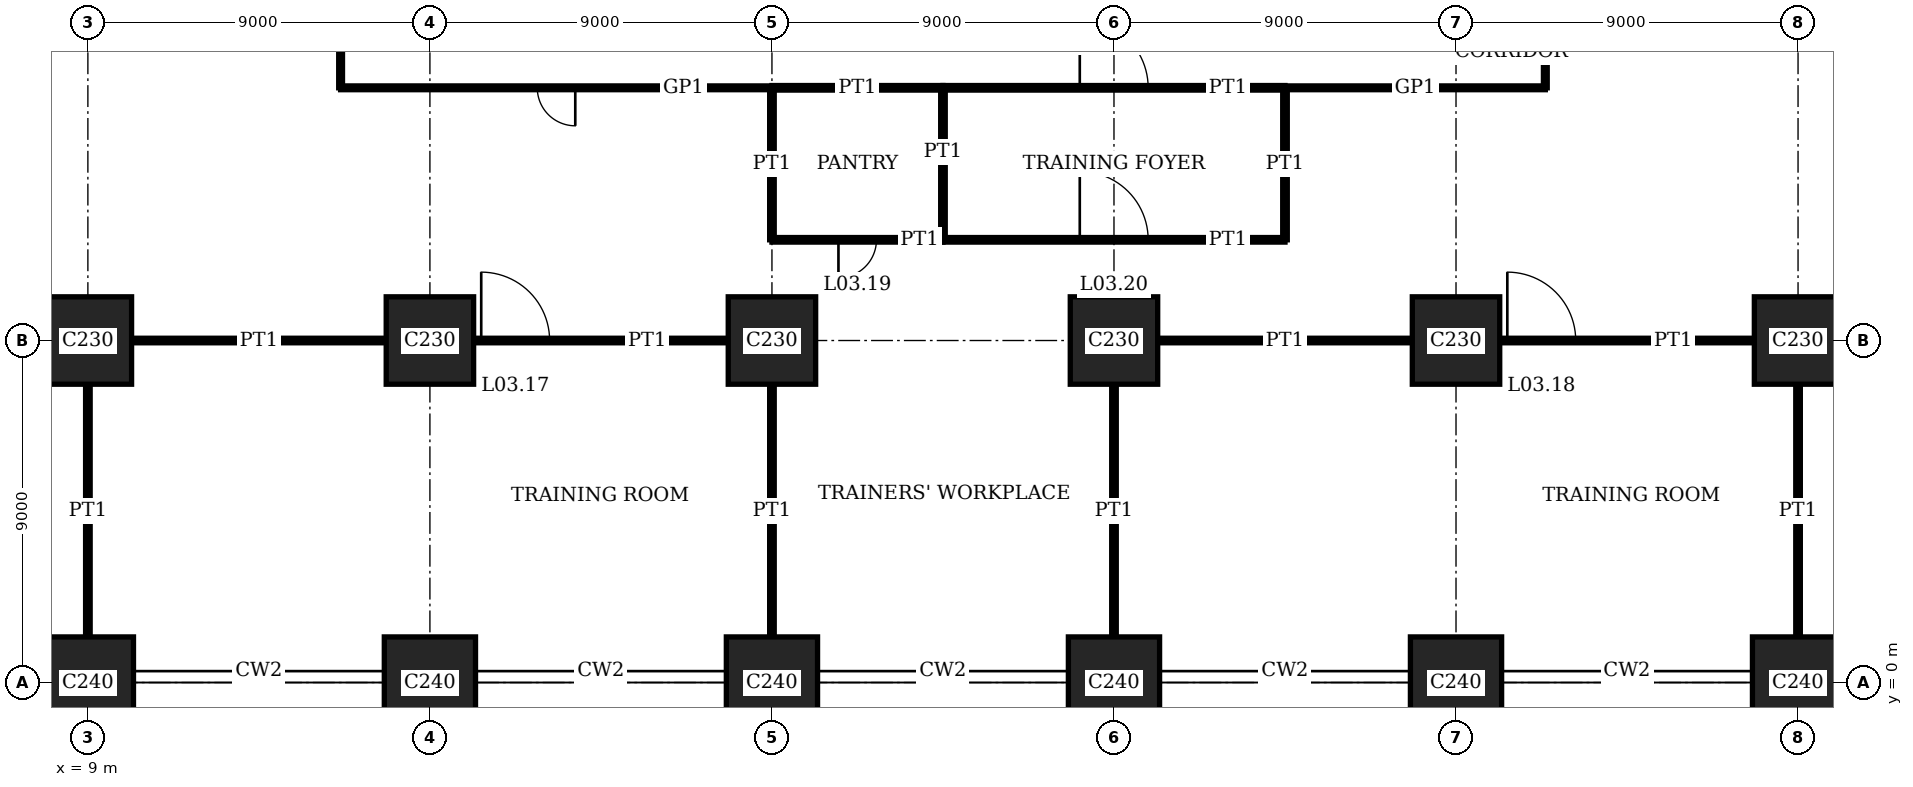
"""IFC4 building model, lengths in metres.
Left out: names, types, materials, properties, quantities, classifications, styles, units other than length and angle.
Written with IfcOpenShell. Run it as: python <this file> out.ifc"""

import sys

from ifc_helpers import new_model, si_unit, direction, frame, frame_2d, origin, origin_2d, place, context, subcontext, project, spatial, rectangle, extrude, element, fill, save


model = new_model("IFC4")
c1 = context("Model", 3, precision=1e-05, world=origin(), true_north=direction((0.0, 1.0)))
c2 = subcontext(c1, "Body", "Model", "MODEL_VIEW")
j1 = project(units=[si_unit("LENGTHUNIT", "METRE"), si_unit("PLANEANGLEUNIT", "RADIAN")], contexts=[c1])
p1 = place(None, origin())
s1 = spatial("IfcSite", under=j1, at=p1, CompositionType="ELEMENT")
p2 = place(p1, origin())
s2 = spatial("IfcBuilding", under=s1, at=p2, CompositionType="ELEMENT")
p3 = place(p2, frame((0.0, 0.0, 15.8)))
s3 = spatial("IfcBuildingStorey", under=s2, at=p3, CompositionType="ELEMENT", Elevation=15.8)
p4 = place(p3, frame((9.0, 0.0, 0.0), z_axis=(0.0, 0.0, 1.0), x_axis=(1.0, 0.0, 0.0)))
e1 = element("IfcColumn", 1, at=p4, inside=s3, PredefinedType="COLUMN", context=c2, shape_type="SweptSolid", body=[
    extrude(rectangle(XDim=2.4, YDim=2.4, at=origin_2d()), origin(), (0.0, 0.0, 1.0), 4.0),
])
p5 = place(p3, frame((9.0, 9.0, 0.0), z_axis=(0.0, 0.0, 1.0), x_axis=(1.0, 0.0, 0.0)))
e2 = element("IfcColumn", 2, at=p5, inside=s3, PredefinedType="COLUMN", context=c2, shape_type="SweptSolid", body=[
    extrude(rectangle(XDim=2.3, YDim=2.3, at=origin_2d()), origin(), (0.0, 0.0, 1.0), 4.0),
])
p6 = place(p3, frame((18.0, 0.0, 0.0), z_axis=(0.0, 0.0, 1.0), x_axis=(1.0, 0.0, 0.0)))
e3 = element("IfcColumn", 3, at=p6, inside=s3, PredefinedType="COLUMN", context=c2, shape_type="SweptSolid", body=[
    extrude(rectangle(XDim=2.4, YDim=2.4, at=origin_2d()), origin(), (0.0, 0.0, 1.0), 4.0),
])
p7 = place(p3, frame((18.0, 9.0, 0.0), z_axis=(0.0, 0.0, 1.0), x_axis=(1.0, 0.0, 0.0)))
e4 = element("IfcColumn", 4, at=p7, inside=s3, PredefinedType="COLUMN", context=c2, shape_type="SweptSolid", body=[
    extrude(rectangle(XDim=2.3, YDim=2.3, at=origin_2d()), origin(), (0.0, 0.0, 1.0), 4.0),
])
p8 = place(p3, frame((27.0, 0.0, 0.0), z_axis=(0.0, 0.0, 1.0), x_axis=(1.0, 0.0, 0.0)))
e5 = element("IfcColumn", 5, at=p8, inside=s3, PredefinedType="COLUMN", context=c2, shape_type="SweptSolid", body=[
    extrude(rectangle(XDim=2.4, YDim=2.4, at=origin_2d()), origin(), (0.0, 0.0, 1.0), 4.0),
])
p9 = place(p3, frame((27.0, 9.0, 0.0), z_axis=(0.0, 0.0, 1.0), x_axis=(1.0, 0.0, 0.0)))
e6 = element("IfcColumn", 6, at=p9, inside=s3, PredefinedType="COLUMN", context=c2, shape_type="SweptSolid", body=[
    extrude(rectangle(XDim=2.3, YDim=2.3, at=origin_2d()), origin(), (0.0, 0.0, 1.0), 4.0),
])
p10 = place(p3, frame((36.0, 0.0, 0.0), z_axis=(0.0, 0.0, 1.0), x_axis=(1.0, 0.0, 0.0)))
e7 = element("IfcColumn", 7, at=p10, inside=s3, PredefinedType="COLUMN", context=c2, shape_type="SweptSolid", body=[
    extrude(rectangle(XDim=2.4, YDim=2.4, at=origin_2d()), origin(), (0.0, 0.0, 1.0), 4.0),
])
p11 = place(p3, frame((36.0, 9.0, 0.0), z_axis=(0.0, 0.0, 1.0), x_axis=(1.0, 0.0, 0.0)))
e8 = element("IfcColumn", 8, at=p11, inside=s3, PredefinedType="COLUMN", context=c2, shape_type="SweptSolid", body=[
    extrude(rectangle(XDim=2.3, YDim=2.3, at=origin_2d()), origin(), (0.0, 0.0, 1.0), 4.0),
])
p12 = place(p3, frame((45.0, 0.0, 0.0), z_axis=(0.0, 0.0, 1.0), x_axis=(1.0, 0.0, 0.0)))
e9 = element("IfcColumn", 9, at=p12, inside=s3, PredefinedType="COLUMN", context=c2, shape_type="SweptSolid", body=[
    extrude(rectangle(XDim=2.4, YDim=2.4, at=origin_2d()), origin(), (0.0, 0.0, 1.0), 4.0),
])
p13 = place(p3, frame((45.0, 9.0, 0.0), z_axis=(0.0, 0.0, 1.0), x_axis=(1.0, 0.0, 0.0)))
e10 = element("IfcColumn", 10, at=p13, inside=s3, PredefinedType="COLUMN", context=c2, shape_type="SweptSolid", body=[
    extrude(rectangle(XDim=2.3, YDim=2.3, at=origin_2d()), origin(), (0.0, 0.0, 1.0), 4.0),
])
p14 = place(p3, frame((54.0, 0.0, 0.0), z_axis=(0.0, 0.0, 1.0), x_axis=(1.0, 0.0, 0.0)))
e11 = element("IfcColumn", 11, at=p14, inside=s3, PredefinedType="COLUMN", context=c2, shape_type="SweptSolid", body=[
    extrude(rectangle(XDim=2.4, YDim=2.4, at=origin_2d()), origin(), (0.0, 0.0, 1.0), 4.0),
])
p15 = place(p3, frame((54.0, 9.0, 0.0), z_axis=(0.0, 0.0, 1.0), x_axis=(1.0, 0.0, 0.0)))
e12 = element("IfcColumn", 12, at=p15, inside=s3, PredefinedType="COLUMN", context=c2, shape_type="SweptSolid", body=[
    extrude(rectangle(XDim=2.3, YDim=2.3, at=origin_2d()), origin(), (0.0, 0.0, 1.0), 4.0),
])
p16 = place(p3, frame((10.15, 9.0, 0.0), z_axis=(0.0, 0.0, 1.0), x_axis=(1.0, 0.0, 0.0)))
e13 = element("IfcWall", 13, at=p16, inside=s3, PredefinedType="PARTITIONING", context=c2, shape_type="SweptSolid", body=[
    extrude(rectangle(XDim=6.7, YDim=0.12, at=frame_2d((3.35, 0.0))), origin(), (0.0, 0.0, 1.0), 3.05),
])
p17 = place(p3, frame((19.15, 9.0, 0.0), z_axis=(0.0, 0.0, 1.0), x_axis=(1.0, 0.0, 0.0)))
e14 = element("IfcWall", 14, at=p17, inside=s3, PredefinedType="PARTITIONING", context=c2, shape_type="SweptSolid", body=[
    extrude(rectangle(XDim=6.7, YDim=0.12, at=frame_2d((3.35, 0.0))), origin(), (0.0, 0.0, 1.0), 3.05),
])
p18 = place(p17, frame((0.2, 0.0, 0.0)))
e15 = element("IfcOpeningElement", 15, at=p18, cuts=e14, PredefinedType="OPENING", context=c2, shape_type="SweptSolid", body=[
    extrude(rectangle(XDim=1.8, YDim=2.4, at=frame_2d((0.9, 1.2))), frame((0.0, 0.07, 0.0), z_axis=(0.0, -1.0, 0.0), x_axis=(1.0, 0.0, 0.0)), (0.0, 0.0, 1.0), 0.14),
])
p19 = place(p3, frame((37.15, 9.0, 0.0), z_axis=(0.0, 0.0, 1.0), x_axis=(1.0, 0.0, 0.0)))
e16 = element("IfcWall", 16, at=p19, inside=s3, PredefinedType="PARTITIONING", context=c2, shape_type="SweptSolid", body=[
    extrude(rectangle(XDim=6.7, YDim=0.12, at=frame_2d((3.35, 0.0))), origin(), (0.0, 0.0, 1.0), 3.05),
])
p20 = place(p3, frame((46.15, 9.0, 0.0), z_axis=(0.0, 0.0, 1.0), x_axis=(1.0, 0.0, 0.0)))
e17 = element("IfcWall", 17, at=p20, inside=s3, PredefinedType="PARTITIONING", context=c2, shape_type="SweptSolid", body=[
    extrude(rectangle(XDim=6.7, YDim=0.12, at=frame_2d((3.35, 0.0))), origin(), (0.0, 0.0, 1.0), 3.05),
])
p21 = place(p20, frame((0.2, 0.0, 0.0)))
e18 = element("IfcOpeningElement", 18, at=p21, cuts=e17, PredefinedType="OPENING", context=c2, shape_type="SweptSolid", body=[
    extrude(rectangle(XDim=1.8, YDim=2.4, at=frame_2d((0.9, 1.2))), frame((0.0, 0.07, 0.0), z_axis=(0.0, -1.0, 0.0), x_axis=(1.0, 0.0, 0.0)), (0.0, 0.0, 1.0), 0.14),
])
p22 = place(p3, frame((27.0, 11.65, 0.0), z_axis=(0.0, 0.0, 1.0), x_axis=(1.0, 0.0, 0.0)))
e19 = element("IfcWall", 19, at=p22, inside=s3, PredefinedType="PARTITIONING", context=c2, shape_type="SweptSolid", body=[
    extrude(rectangle(XDim=4.5, YDim=0.12, at=frame_2d((2.25, 0.0))), origin(), (0.0, 0.0, 1.0), 3.75),
])
p23 = place(p22, frame((1.75, 0.0, 0.0)))
e20 = element("IfcOpeningElement", 20, at=p23, cuts=e19, PredefinedType="OPENING", context=c2, shape_type="SweptSolid", body=[
    extrude(rectangle(XDim=1.0, YDim=2.4, at=frame_2d((0.5, 1.2))), frame((0.0, 0.07, 0.0), z_axis=(0.0, -1.0, 0.0), x_axis=(1.0, 0.0, 0.0)), (0.0, 0.0, 1.0), 0.14),
])
p24 = place(p3, frame((31.5, 11.65, 0.0), z_axis=(0.0, 0.0, 1.0), x_axis=(1.0, 0.0, 0.0)))
e21 = element("IfcWall", 21, at=p24, inside=s3, PredefinedType="PARTITIONING", context=c2, shape_type="SweptSolid", body=[
    extrude(rectangle(XDim=9.0, YDim=0.12, at=frame_2d((4.5, 0.0))), origin(), (0.0, 0.0, 1.0), 3.75),
])
p25 = place(p24, frame((3.6, 0.0, 0.0)))
e22 = element("IfcOpeningElement", 22, at=p25, cuts=e21, PredefinedType="OPENING", context=c2, shape_type="SweptSolid", body=[
    extrude(rectangle(XDim=1.8, YDim=2.4, at=frame_2d((0.9, 1.2))), frame((0.0, 0.07, 0.0), z_axis=(0.0, -1.0, 0.0), x_axis=(1.0, 0.0, 0.0)), (0.0, 0.0, 1.0), 0.14),
])
p26 = place(p3, frame((27.0, 15.65, 0.0), z_axis=(0.0, 0.0, 1.0), x_axis=(1.0, 0.0, 0.0)))
e23 = element("IfcWall", 23, at=p26, inside=s3, PredefinedType="PARTITIONING", context=c2, shape_type="SweptSolid", body=[
    extrude(rectangle(XDim=4.5, YDim=0.12, at=frame_2d((2.25, 0.0))), origin(), (0.0, 0.0, 1.0), 3.75),
])
p27 = place(p3, frame((31.5, 15.65, 0.0), z_axis=(0.0, 0.0, 1.0), x_axis=(1.0, 0.0, 0.0)))
e24 = element("IfcWall", 24, at=p27, inside=s3, PredefinedType="PARTITIONING", context=c2, shape_type="SweptSolid", body=[
    extrude(rectangle(XDim=9.0, YDim=0.12, at=frame_2d((4.5, 0.0))), origin(), (0.0, 0.0, 1.0), 3.75),
])
p28 = place(p27, frame((3.6, 0.0, 0.0)))
e25 = element("IfcOpeningElement", 25, at=p28, cuts=e24, PredefinedType="OPENING", context=c2, shape_type="SweptSolid", body=[
    extrude(rectangle(XDim=1.8, YDim=2.4, at=frame_2d((0.9, 1.2))), frame((0.0, 0.07, 0.0), z_axis=(0.0, -1.0, 0.0), x_axis=(1.0, 0.0, 0.0)), (0.0, 0.0, 1.0), 0.14),
])
p29 = place(p3, frame((15.65, 15.65, 0.0), z_axis=(0.0, 0.0, 1.0), x_axis=(1.0, 0.0, 0.0)))
e26 = element("IfcWall", 26, at=p29, inside=s3, PredefinedType="PARTITIONING", context=c2, shape_type="SweptSolid", body=[
    extrude(rectangle(XDim=11.35, YDim=0.1, at=frame_2d((5.675, 0.0))), origin(), (0.0, 0.0, 1.0), 3.75),
])
p30 = place(p29, frame((5.175, 0.0, 0.0)))
e27 = element("IfcOpeningElement", 27, at=p30, cuts=e26, PredefinedType="OPENING", context=c2, shape_type="SweptSolid", body=[
    extrude(rectangle(XDim=1.0, YDim=2.4, at=frame_2d((0.5, 1.2))), frame((0.0, 0.06, 0.0), z_axis=(0.0, -1.0, 0.0), x_axis=(1.0, 0.0, 0.0)), (0.0, 0.0, 1.0), 0.12),
])
p31 = place(p3, frame((40.5, 15.65, 0.0), z_axis=(0.0, 0.0, 1.0), x_axis=(1.0, 0.0, 0.0)))
e28 = element("IfcWall", 28, at=p31, inside=s3, PredefinedType="PARTITIONING", context=c2, shape_type="SweptSolid", body=[
    extrude(rectangle(XDim=6.85, YDim=0.1, at=frame_2d((3.425, 0.0))), origin(), (0.0, 0.0, 1.0), 3.75),
])
p32 = place(p3, frame((9.0, 1.2, 0.0), z_axis=(0.0, 0.0, 1.0), x_axis=(0.0, 1.0, 0.0)))
e29 = element("IfcWall", 29, at=p32, inside=s3, PredefinedType="PARTITIONING", context=c2, shape_type="SweptSolid", body=[
    extrude(rectangle(XDim=6.65, YDim=0.12, at=frame_2d((3.325, 0.0))), origin(), (0.0, 0.0, 1.0), 3.05),
])
p33 = place(p3, frame((15.65, 15.65, 0.0), z_axis=(0.0, 0.0, 1.0), x_axis=(0.0, 1.0, 0.0)))
e30 = element("IfcWall", 30, at=p33, inside=s3, PredefinedType="PARTITIONING", context=c2, shape_type="SweptSolid", body=[
    extrude(rectangle(XDim=22.7, YDim=0.1, at=frame_2d((11.35, 0.0))), origin(), (0.0, 0.0, 1.0), 3.75),
])
p34 = place(p33, frame((10.85, 0.0, 0.0)))
e31 = element("IfcOpeningElement", 31, at=p34, cuts=e30, PredefinedType="OPENING", context=c2, shape_type="SweptSolid", body=[
    extrude(rectangle(XDim=1.0, YDim=2.4, at=frame_2d((0.5, 1.2))), frame((0.0, 0.06, 0.0), z_axis=(0.0, -1.0, 0.0), x_axis=(1.0, 0.0, 0.0)), (0.0, 0.0, 1.0), 0.12),
])
p35 = place(p3, frame((27.0, 1.2, 0.0), z_axis=(0.0, 0.0, 1.0), x_axis=(0.0, 1.0, 0.0)))
e32 = element("IfcWall", 32, at=p35, inside=s3, PredefinedType="PARTITIONING", context=c2, shape_type="SweptSolid", body=[
    extrude(rectangle(XDim=6.65, YDim=0.12, at=frame_2d((3.325, 0.0))), origin(), (0.0, 0.0, 1.0), 3.05),
])
p36 = place(p3, frame((27.0, 11.65, 0.0), z_axis=(0.0, 0.0, 1.0), x_axis=(0.0, 1.0, 0.0)))
e33 = element("IfcWall", 33, at=p36, inside=s3, PredefinedType="PARTITIONING", context=c2, shape_type="SweptSolid", body=[
    extrude(rectangle(XDim=4.0, YDim=0.12, at=frame_2d((2.0, 0.0))), origin(), (0.0, 0.0, 1.0), 3.05),
])
p37 = place(p3, frame((31.5, 11.65, 0.0), z_axis=(0.0, 0.0, 1.0), x_axis=(0.0, 1.0, 0.0)))
e34 = element("IfcWall", 34, at=p37, inside=s3, PredefinedType="PARTITIONING", context=c2, shape_type="SweptSolid", body=[
    extrude(rectangle(XDim=4.0, YDim=0.12, at=frame_2d((2.0, 0.0))), origin(), (0.0, 0.0, 1.0), 3.75),
])
p38 = place(p3, frame((36.0, 1.2, 0.0), z_axis=(0.0, 0.0, 1.0), x_axis=(0.0, 1.0, 0.0)))
e35 = element("IfcWall", 35, at=p38, inside=s3, PredefinedType="PARTITIONING", context=c2, shape_type="SweptSolid", body=[
    extrude(rectangle(XDim=6.65, YDim=0.12, at=frame_2d((3.325, 0.0))), origin(), (0.0, 0.0, 1.0), 3.05),
])
p39 = place(p3, frame((40.5, 11.65, 0.0), z_axis=(0.0, 0.0, 1.0), x_axis=(0.0, 1.0, 0.0)))
e36 = element("IfcWall", 36, at=p39, inside=s3, PredefinedType="PARTITIONING", context=c2, shape_type="SweptSolid", body=[
    extrude(rectangle(XDim=4.0, YDim=0.12, at=frame_2d((2.0, 0.0))), origin(), (0.0, 0.0, 1.0), 3.75),
])
p40 = place(p3, frame((47.35, 15.65, 0.0), z_axis=(0.0, 0.0, 1.0), x_axis=(0.0, 1.0, 0.0)))
e37 = element("IfcWall", 37, at=p40, inside=s3, PredefinedType="PARTITIONING", context=c2, shape_type="SweptSolid", body=[
    extrude(rectangle(XDim=1.8, YDim=0.1, at=frame_2d((0.9, 0.0))), origin(), (0.0, 0.0, 1.0), 3.75),
])
p41 = place(p3, frame((54.0, 1.2, 0.0), z_axis=(0.0, 0.0, 1.0), x_axis=(0.0, 1.0, 0.0)))
e38 = element("IfcWall", 38, at=p41, inside=s3, PredefinedType="PARTITIONING", context=c2, shape_type="SweptSolid", body=[
    extrude(rectangle(XDim=6.65, YDim=0.12, at=frame_2d((3.325, 0.0))), origin(), (0.0, 0.0, 1.0), 3.05),
])
p42 = place(p18, origin())
e39 = element("IfcDoor", 39, at=p42, inside=s3, OperationType="DOUBLE_DOOR_SINGLE_SWING", PredefinedType="DOOR", context=c2, shape_type="SweptSolid", body=[
    extrude(rectangle(XDim=1.8, YDim=2.4, at=frame_2d((0.9, 1.2))), frame((0.0, 0.025, 0.0), z_axis=(0.0, -1.0, 0.0), x_axis=(1.0, 0.0, 0.0)), (0.0, 0.0, 1.0), 0.05),
])
fill(e15, e39)
p43 = place(p21, origin())
e40 = element("IfcDoor", 40, at=p43, inside=s3, OperationType="DOUBLE_DOOR_SINGLE_SWING", PredefinedType="DOOR", context=c2, shape_type="SweptSolid", body=[
    extrude(rectangle(XDim=1.8, YDim=2.4, at=frame_2d((0.9, 1.2))), frame((0.0, 0.025, 0.0), z_axis=(0.0, -1.0, 0.0), x_axis=(1.0, 0.0, 0.0)), (0.0, 0.0, 1.0), 0.05),
])
fill(e18, e40)
p44 = place(p23, origin())
e41 = element("IfcDoor", 41, at=p44, inside=s3, OperationType="SINGLE_SWING_LEFT", PredefinedType="DOOR", context=c2, shape_type="SweptSolid", body=[
    extrude(rectangle(XDim=1.0, YDim=2.4, at=frame_2d((0.5, 1.2))), frame((0.0, 0.025, 0.0), z_axis=(0.0, -1.0, 0.0), x_axis=(1.0, 0.0, 0.0)), (0.0, 0.0, 1.0), 0.05),
])
fill(e20, e41)
p45 = place(p25, origin())
e42 = element("IfcDoor", 42, at=p45, inside=s3, OperationType="DOUBLE_DOOR_SINGLE_SWING", PredefinedType="DOOR", context=c2, shape_type="SweptSolid", body=[
    extrude(rectangle(XDim=1.8, YDim=2.4, at=frame_2d((0.9, 1.2))), frame((0.0, 0.025, 0.0), z_axis=(0.0, -1.0, 0.0), x_axis=(1.0, 0.0, 0.0)), (0.0, 0.0, 1.0), 0.05),
])
fill(e22, e42)
p46 = place(p28, origin())
e43 = element("IfcDoor", 43, at=p46, inside=s3, OperationType="DOUBLE_DOOR_SINGLE_SWING", PredefinedType="DOOR", context=c2, shape_type="SweptSolid", body=[
    extrude(rectangle(XDim=1.8, YDim=2.4, at=frame_2d((0.9, 1.2))), frame((0.0, 0.025, 0.0), z_axis=(0.0, -1.0, 0.0), x_axis=(1.0, 0.0, 0.0)), (0.0, 0.0, 1.0), 0.05),
])
fill(e25, e43)
p47 = place(p30, origin())
e44 = element("IfcDoor", 44, at=p47, inside=s3, OperationType="SINGLE_SWING_RIGHT", PredefinedType="DOOR", context=c2, shape_type="SweptSolid", body=[
    extrude(rectangle(XDim=1.0, YDim=2.4, at=frame_2d((0.5, 1.2))), frame((0.0, 0.02, 0.0), z_axis=(0.0, -1.0, 0.0), x_axis=(1.0, 0.0, 0.0)), (0.0, 0.0, 1.0), 0.04),
])
fill(e27, e44)
save(model, sys.argv[1])
